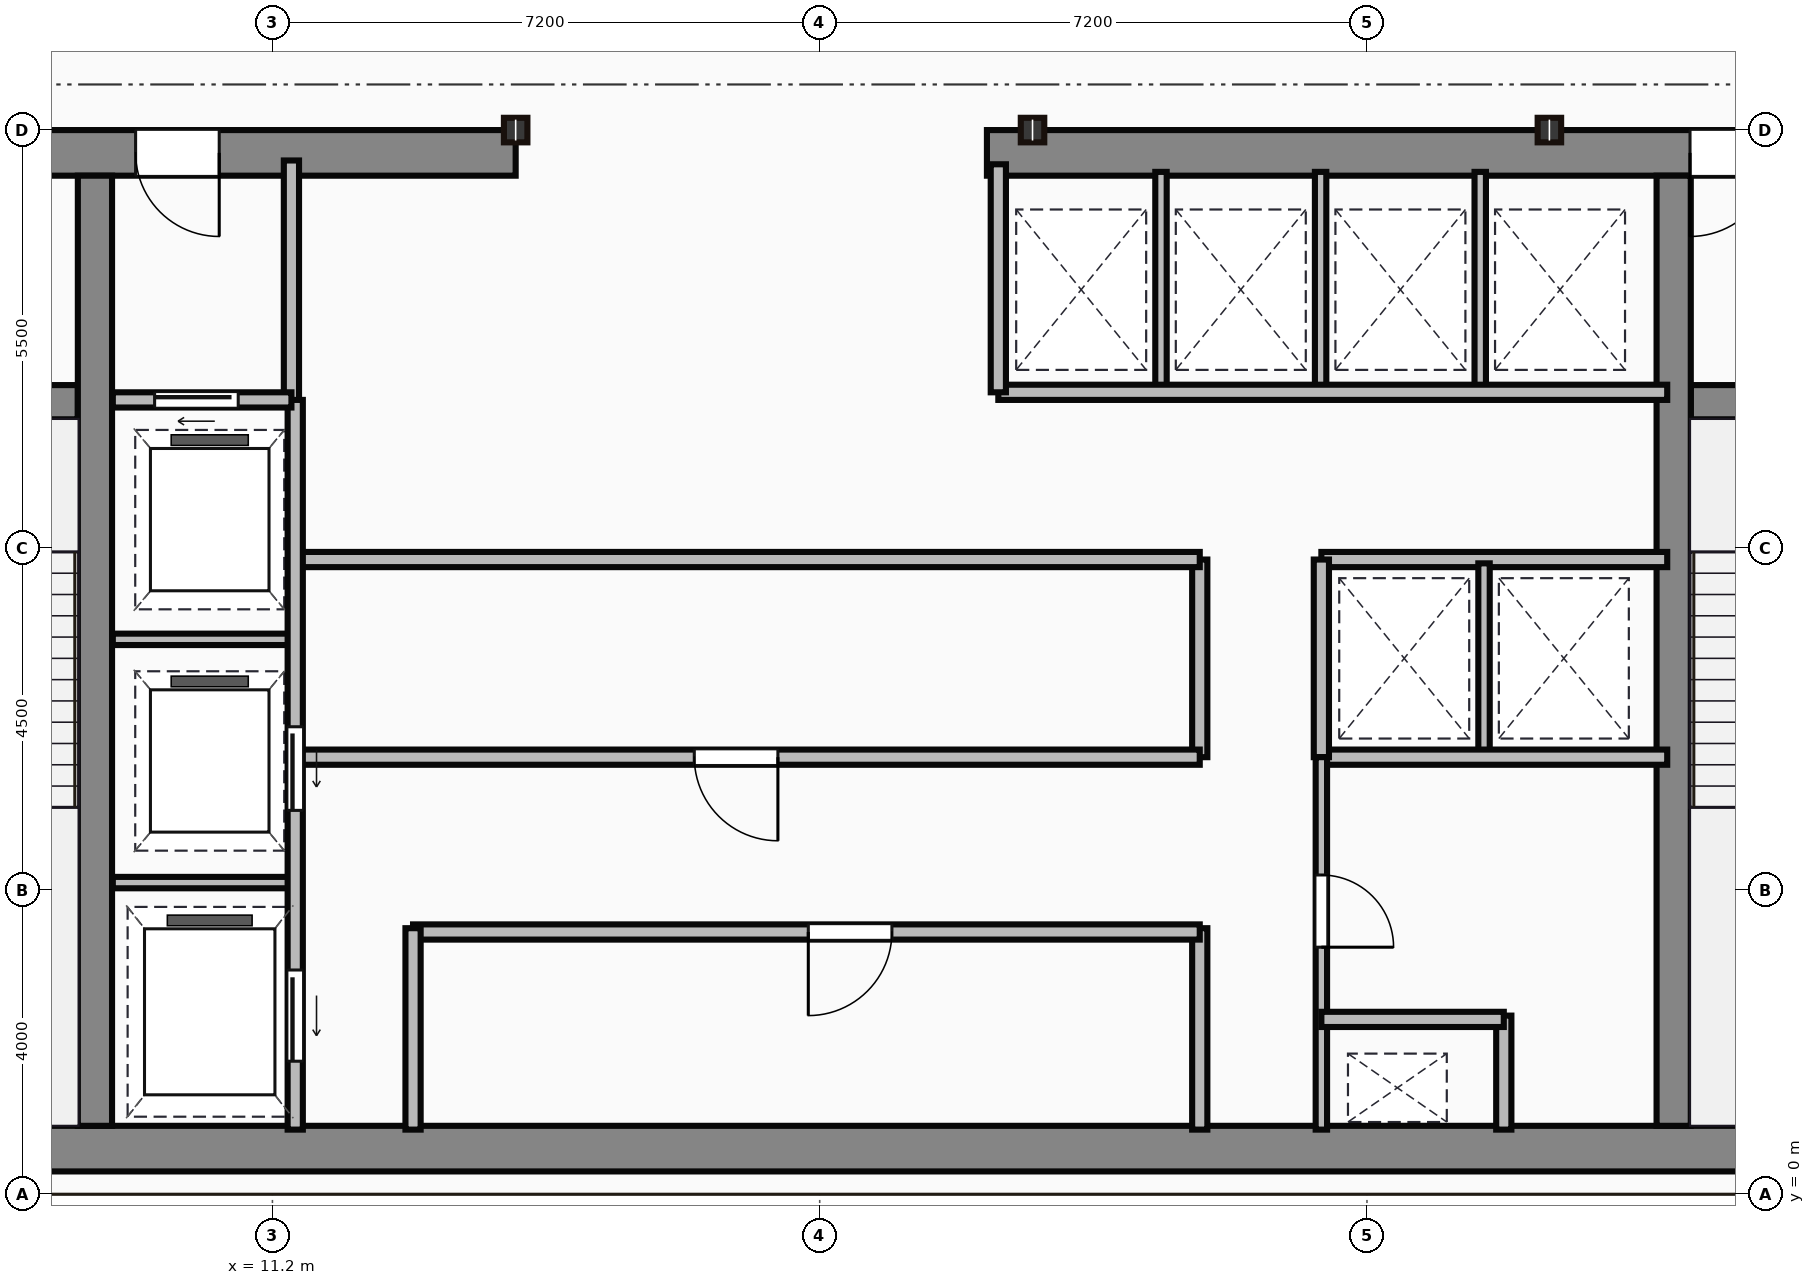
"""IFC4 building model, lengths in metres.
Left out: names, types, materials, properties, quantities, classifications, styles, units other than length and angle.
Written with IfcOpenShell. Run it as: python <this file> out.ifc"""

import sys

from ifc_helpers import new_model, si_unit, direction, frame, frame_2d, origin, origin_2d, place, context, subcontext, project, spatial, rectangle, i_section, extrude, source, transform, mapped, element, fill, save


model = new_model("IFC4")
c1 = context("Model", 3, precision=1e-05, world=origin(), true_north=direction((0.0, 1.0)))
c2 = subcontext(c1, "Body", "Model", "MODEL_VIEW")
j1 = project(units=[si_unit("LENGTHUNIT", "METRE"), si_unit("PLANEANGLEUNIT", "RADIAN")], contexts=[c1])
p1 = place(None, origin())
s1 = spatial("IfcSite", under=j1, at=p1, CompositionType="ELEMENT")
p2 = place(p1, origin())
s2 = spatial("IfcBuilding", under=s1, at=p2, CompositionType="ELEMENT")
p3 = place(p2, frame((0.0, 0.0, 236.05)))
s3 = spatial("IfcBuildingStorey", under=s2, at=p3, CompositionType="ELEMENT", Elevation=236.05)
m1 = source(origin(), c2, "Body", "SweptSolid", [
    extrude(rectangle(XDim=29.5, YDim=0.6, at=frame_2d((14.75, 0.0))), origin(), (0.0, 0.0, 1.0), 4.5),
])
p4 = place(p3, frame((4.5, 0.6, 0.0), z_axis=(0.0, 0.0, 1.0), x_axis=(1.0, 0.0, 0.0)))
e1 = element("IfcWall", 1, at=p4, inside=s3, PredefinedType="SHEAR", context=c2, shape_type="MappedRepresentation", body=[
    mapped(m1, transform((0.0, 0.0, 0.0))),
])
m2 = source(origin(), c2, "Body", "SweptSolid", [
    extrude(rectangle(XDim=9.1, YDim=0.6, at=frame_2d((4.55, 0.0))), origin(), (0.0, 0.0, 1.0), 4.5),
])
p5 = place(p3, frame((5.3, 13.7, 0.0), z_axis=(0.0, 0.0, 1.0), x_axis=(1.0, 0.0, 0.0)))
e2 = element("IfcWall", 2, at=p5, inside=s3, PredefinedType="SHEAR", context=c2, shape_type="MappedRepresentation", body=[
    mapped(m2, transform((0.0, 0.0, 0.0))),
])
p6 = place(p5, frame((4.1, 0.0, 0.0)))
e3 = element("IfcOpeningElement", 3, at=p6, cuts=e2, PredefinedType="OPENING", context=c2, shape_type="SweptSolid", body=[
    extrude(rectangle(XDim=1.1, YDim=2.15, at=frame_2d((0.55, 1.075))), frame((0.0, 0.31, 0.0), z_axis=(0.0, -1.0, 0.0), x_axis=(1.0, 0.0, 0.0)), (0.0, 0.0, 1.0), 0.62),
])
m3 = source(origin(), c2, "Body", "SweptSolid", [
    extrude(rectangle(XDim=12.6, YDim=0.6, at=frame_2d((6.3, 0.0))), origin(), (0.0, 0.0, 1.0), 4.5),
])
p7 = place(p3, frame((20.6, 13.7, 0.0), z_axis=(0.0, 0.0, 1.0), x_axis=(1.0, 0.0, 0.0)))
e4 = element("IfcWall", 4, at=p7, inside=s3, PredefinedType="SHEAR", context=c2, shape_type="MappedRepresentation", body=[
    mapped(m3, transform((0.0, 0.0, 0.0))),
])
p8 = place(p7, frame((9.25, 0.0, 0.0)))
e5 = element("IfcOpeningElement", 5, at=p8, cuts=e4, PredefinedType="OPENING", context=c2, shape_type="SweptSolid", body=[
    extrude(rectangle(XDim=1.1, YDim=2.15, at=frame_2d((0.55, 1.075))), frame((0.0, 0.31, 0.0), z_axis=(0.0, -1.0, 0.0), x_axis=(1.0, 0.0, 0.0)), (0.0, 0.0, 1.0), 0.62),
])
m4 = source(origin(), c2, "Body", "SweptSolid", [
    extrude(rectangle(XDim=12.5, YDim=0.45, at=frame_2d((6.25, 0.0))), origin(), (0.0, 0.0, 1.0), 4.5),
])
for number, where, z_axis, x_axis in (
    (6, (8.865, 0.9, 0.0), (0.0, 0.0, 1.0), (0.0, 1.0, 0.0)),
    (7, (29.635, 0.9, 0.0), (0.0, 0.0, 1.0), (0.0, 1.0, 0.0)),
):
    element("IfcWall", number, at=place(p3, frame(where, z_axis=z_axis, x_axis=x_axis)), inside=s3, PredefinedType="SHEAR", context=c2, shape_type="MappedRepresentation", body=[
        mapped(m4, transform((0.0, 0.0, 0.0))),
    ])
m5 = source(origin(), c2, "Body", "SweptSolid", [
    extrude(rectangle(XDim=3.39, YDim=0.45, at=frame_2d((1.695, 0.0))), origin(), (0.0, 0.0, 1.0), 4.5),
])
p9 = place(p3, frame((5.25, 10.42, 0.0), z_axis=(0.0, 0.0, 1.0), x_axis=(1.0, 0.0, 0.0)))
e8 = element("IfcWall", 8, at=p9, inside=s3, PredefinedType="SHEAR", context=c2, shape_type="MappedRepresentation", body=[
    mapped(m5, transform((0.0, 0.0, 0.0))),
])
p10 = place(p9, frame((1.05, 0.0, 0.0)))
e9 = element("IfcOpeningElement", 9, at=p10, cuts=e8, PredefinedType="OPENING", context=c2, shape_type="SweptSolid", body=[
    extrude(rectangle(XDim=1.1, YDim=2.15, at=frame_2d((0.55, 1.075))), frame((0.0, 0.235, 0.0), z_axis=(0.0, -1.0, 0.0), x_axis=(1.0, 0.0, 0.0)), (0.0, 0.0, 1.0), 0.47),
])
p11 = place(p3, frame((29.86, 10.42, 0.0), z_axis=(0.0, 0.0, 1.0), x_axis=(1.0, 0.0, 0.0)))
e10 = element("IfcWall", 10, at=p11, inside=s3, PredefinedType="SHEAR", context=c2, shape_type="MappedRepresentation", body=[
    mapped(m5, transform((0.0, 0.0, 0.0))),
])
p12 = place(p11, frame((1.1, 0.0, 0.0)))
e11 = element("IfcOpeningElement", 11, at=p12, cuts=e10, PredefinedType="OPENING", context=c2, shape_type="SweptSolid", body=[
    extrude(rectangle(XDim=1.1, YDim=2.15, at=frame_2d((0.55, 1.075))), frame((0.0, 0.235, 0.0), z_axis=(0.0, -1.0, 0.0), x_axis=(1.0, 0.0, 0.0)), (0.0, 0.0, 1.0), 0.47),
])
m6 = source(origin(), c2, "Body", "SweptSolid", [
    extrude(i_section(OverallWidth=0.309, OverallDepth=0.323, WebThickness=0.014, FlangeThickness=0.023, at=origin_2d()), origin(), (0.0, 0.0, 1.0), 4.5),
])
for number, where, z_axis, x_axis in (
    (12, (14.4, 14.0, 0.0), (0.0, 0.0, 1.0), (1.0, 0.0, 0.0)),
    (13, (21.2, 14.0, 0.0), (0.0, 0.0, 1.0), (1.0, 0.0, 0.0)),
    (14, (28.0, 14.0, 0.0), (0.0, 0.0, 1.0), (1.0, 0.0, 0.0)),
):
    element("IfcColumn", number, at=place(p3, frame(where, z_axis=z_axis, x_axis=x_axis)), inside=s3, PredefinedType="COLUMN", context=c2, shape_type="MappedRepresentation", body=[
        mapped(m6, transform((0.0, 0.0, 0.0))),
    ])
m7 = source(origin(), c2, "Body", "SweptSolid", [
    extrude(rectangle(XDim=3.18, YDim=0.2, at=frame_2d((1.59, 0.0))), origin(), (0.0, 0.0, 1.0), 4.25),
])
p13 = place(p3, frame((11.45, 10.42, 0.0), z_axis=(0.0, 0.0, 1.0), x_axis=(0.0, 1.0, 0.0)))
e15 = element("IfcWall", 15, at=p13, inside=s3, PredefinedType="PARTITIONING", context=c2, shape_type="MappedRepresentation", body=[
    mapped(m7, transform((0.0, 0.0, 0.0))),
])
m8 = source(origin(), c2, "Body", "SweptSolid", [
    extrude(rectangle(XDim=2.35, YDim=0.2, at=frame_2d((1.175, 0.0))), origin(), (0.0, 0.0, 1.0), 4.25),
])
p14 = place(p3, frame((9.1, 10.45, 0.0), z_axis=(0.0, 0.0, 1.0), x_axis=(1.0, 0.0, 0.0)))
e16 = element("IfcWall", 16, at=p14, inside=s3, PredefinedType="PARTITIONING", context=c2, shape_type="MappedRepresentation", body=[
    mapped(m8, transform((0.0, 0.0, 0.0))),
])
p15 = place(p14, frame((0.55, 0.0, 0.0)))
e17 = element("IfcOpeningElement", 17, at=p15, cuts=e16, PredefinedType="OPENING", context=c2, shape_type="SweptSolid", body=[
    extrude(rectangle(XDim=1.1, YDim=2.15, at=frame_2d((0.55, 1.075))), frame((0.0, 0.11, 0.0), z_axis=(0.0, -1.0, 0.0), x_axis=(1.0, 0.0, 0.0)), (0.0, 0.0, 1.0), 0.22),
])
m9 = source(origin(), c2, "Body", "SweptSolid", [
    extrude(rectangle(XDim=9.6, YDim=0.2, at=frame_2d((4.8, 0.0))), origin(), (0.0, 0.0, 1.0), 4.25),
])
p16 = place(p3, frame((11.5, 0.85, 0.0), z_axis=(0.0, 0.0, 1.0), x_axis=(0.0, 1.0, 0.0)))
e18 = element("IfcWall", 18, at=p16, inside=s3, PredefinedType="PARTITIONING", context=c2, shape_type="MappedRepresentation", body=[
    mapped(m9, transform((0.0, 0.0, 0.0))),
])
p17 = place(p16, frame((4.2, 0.0, 0.0)))
e19 = element("IfcOpeningElement", 19, at=p17, cuts=e18, PredefinedType="OPENING", context=c2, shape_type="SweptSolid", body=[
    extrude(rectangle(XDim=1.1, YDim=2.15, at=frame_2d((0.55, 1.075))), frame((0.0, 0.11, 0.0), z_axis=(0.0, -1.0, 0.0), x_axis=(1.0, 0.0, 0.0)), (0.0, 0.0, 1.0), 0.22),
])
p18 = place(p16, frame((0.9, 0.0, 0.0)))
e20 = element("IfcOpeningElement", 20, at=p18, cuts=e18, PredefinedType="OPENING", context=c2, shape_type="SweptSolid", body=[
    extrude(rectangle(XDim=1.2, YDim=2.15, at=frame_2d((0.6, 1.075))), frame((0.0, 0.11, 0.0), z_axis=(0.0, -1.0, 0.0), x_axis=(1.0, 0.0, 0.0)), (0.0, 0.0, 1.0), 0.22),
])
m10 = source(origin(), c2, "Body", "SweptSolid", [
    extrude(rectangle(XDim=2.4, YDim=0.15, at=frame_2d((1.2, 0.0))), origin(), (0.0, 0.0, 1.0), 4.25),
])
for number, where, z_axis, x_axis in (
    (21, (9.1, 4.1, 0.0), (0.0, 0.0, 1.0), (1.0, 0.0, 0.0)),
    (22, (9.1, 7.3, 0.0), (0.0, 0.0, 1.0), (1.0, 0.0, 0.0)),
):
    element("IfcWall", number, at=place(p3, frame(where, z_axis=z_axis, x_axis=x_axis)), inside=s3, PredefinedType="PARTITIONING", context=c2, shape_type="MappedRepresentation", body=[
        mapped(m10, transform((0.0, 0.0, 0.0))),
    ])
m11 = source(origin(), c2, "Body", "SweptSolid", [
    extrude(rectangle(XDim=2.65, YDim=0.2, at=frame_2d((1.325, 0.0))), origin(), (0.0, 0.0, 1.0), 4.25),
])
p19 = place(p3, frame((13.05, 0.85, 0.0), z_axis=(0.0, 0.0, 1.0), x_axis=(0.0, 1.0, 0.0)))
e23 = element("IfcWall", 23, at=p19, inside=s3, PredefinedType="PARTITIONING", context=c2, shape_type="MappedRepresentation", body=[
    mapped(m11, transform((0.0, 0.0, 0.0))),
])
m12 = source(origin(), c2, "Body", "SweptSolid", [
    extrude(rectangle(XDim=10.35, YDim=0.2, at=frame_2d((5.175, 0.0))), origin(), (0.0, 0.0, 1.0), 4.25),
])
p20 = place(p3, frame((13.05, 3.45, 0.0), z_axis=(0.0, 0.0, 1.0), x_axis=(1.0, 0.0, 0.0)))
e24 = element("IfcWall", 24, at=p20, inside=s3, PredefinedType="PARTITIONING", context=c2, shape_type="MappedRepresentation", body=[
    mapped(m12, transform((0.0, 0.0, 0.0))),
])
p21 = place(p20, frame((5.2, 0.0, 0.0)))
e25 = element("IfcOpeningElement", 25, at=p21, cuts=e24, PredefinedType="OPENING", context=c2, shape_type="SweptSolid", body=[
    extrude(rectangle(XDim=1.1, YDim=2.15, at=frame_2d((0.55, 1.075))), frame((0.0, 0.11, 0.0), z_axis=(0.0, -1.0, 0.0), x_axis=(1.0, 0.0, 0.0)), (0.0, 0.0, 1.0), 0.22),
])
p22 = place(p3, frame((23.4, 0.85, 0.0), z_axis=(0.0, 0.0, 1.0), x_axis=(0.0, 1.0, 0.0)))
e26 = element("IfcWall", 26, at=p22, inside=s3, PredefinedType="PARTITIONING", context=c2, shape_type="MappedRepresentation", body=[
    mapped(m11, transform((0.0, 0.0, 0.0))),
])
m13 = source(origin(), c2, "Body", "SweptSolid", [
    extrude(rectangle(XDim=11.85, YDim=0.2, at=frame_2d((5.925, 0.0))), origin(), (0.0, 0.0, 1.0), 4.25),
])
p23 = place(p3, frame((11.55, 5.75, 0.0), z_axis=(0.0, 0.0, 1.0), x_axis=(1.0, 0.0, 0.0)))
e27 = element("IfcWall", 27, at=p23, inside=s3, PredefinedType="PARTITIONING", context=c2, shape_type="MappedRepresentation", body=[
    mapped(m13, transform((0.0, 0.0, 0.0))),
])
p24 = place(p23, frame((5.2, 0.0, 0.0)))
e28 = element("IfcOpeningElement", 28, at=p24, cuts=e27, PredefinedType="OPENING", context=c2, shape_type="SweptSolid", body=[
    extrude(rectangle(XDim=1.1, YDim=2.15, at=frame_2d((0.55, 1.075))), frame((0.0, 0.11, 0.0), z_axis=(0.0, -1.0, 0.0), x_axis=(1.0, 0.0, 0.0)), (0.0, 0.0, 1.0), 0.22),
])
p25 = place(p3, frame((11.55, 8.35, 0.0), z_axis=(0.0, 0.0, 1.0), x_axis=(1.0, 0.0, 0.0)))
e29 = element("IfcWall", 29, at=p25, inside=s3, PredefinedType="PARTITIONING", context=c2, shape_type="MappedRepresentation", body=[
    mapped(m13, transform((0.0, 0.0, 0.0))),
])
m14 = source(origin(), c2, "Body", "SweptSolid", [
    extrude(rectangle(XDim=2.6, YDim=0.2, at=frame_2d((1.3, 0.0))), origin(), (0.0, 0.0, 1.0), 4.25),
])
p26 = place(p3, frame((23.4, 5.75, 0.0), z_axis=(0.0, 0.0, 1.0), x_axis=(0.0, 1.0, 0.0)))
e30 = element("IfcWall", 30, at=p26, inside=s3, PredefinedType="PARTITIONING", context=c2, shape_type="MappedRepresentation", body=[
    mapped(m14, transform((0.0, 0.0, 0.0))),
])
m15 = source(origin(), c2, "Body", "SweptSolid", [
    extrude(rectangle(XDim=8.8, YDim=0.2, at=frame_2d((4.4, 0.0))), origin(), (0.0, 0.0, 1.0), 4.25),
])
p27 = place(p3, frame((20.75, 10.55, 0.0), z_axis=(0.0, 0.0, 1.0), x_axis=(1.0, 0.0, 0.0)))
e31 = element("IfcWall", 31, at=p27, inside=s3, PredefinedType="PARTITIONING", context=c2, shape_type="MappedRepresentation", body=[
    mapped(m15, transform((0.0, 0.0, 0.0))),
])
m16 = source(origin(), c2, "Body", "SweptSolid", [
    extrude(rectangle(XDim=3.0, YDim=0.2, at=frame_2d((1.5, 0.0))), origin(), (0.0, 0.0, 1.0), 4.25),
])
p28 = place(p3, frame((20.75, 10.55, 0.0), z_axis=(0.0, 0.0, 1.0), x_axis=(0.0, 1.0, 0.0)))
e32 = element("IfcWall", 32, at=p28, inside=s3, PredefinedType="PARTITIONING", context=c2, shape_type="MappedRepresentation", body=[
    mapped(m16, transform((0.0, 0.0, 0.0))),
])
m17 = source(origin(), c2, "Body", "SweptSolid", [
    extrude(rectangle(XDim=2.85, YDim=0.15, at=frame_2d((1.425, 0.0))), origin(), (0.0, 0.0, 1.0), 4.25),
])
for number, where, z_axis, x_axis in (
    (33, (22.89, 10.6, 0.0), (0.0, 0.0, 1.0), (0.0, 1.0, 0.0)),
    (34, (24.99, 10.6, 0.0), (0.0, 0.0, 1.0), (0.0, 1.0, 0.0)),
    (35, (27.09, 10.6, 0.0), (0.0, 0.0, 1.0), (0.0, 1.0, 0.0)),
):
    element("IfcWall", number, at=place(p3, frame(where, z_axis=z_axis, x_axis=x_axis)), inside=s3, PredefinedType="PARTITIONING", context=c2, shape_type="MappedRepresentation", body=[
        mapped(m17, transform((0.0, 0.0, 0.0))),
    ])
m18 = source(origin(), c2, "Body", "SweptSolid", [
    extrude(rectangle(XDim=4.55, YDim=0.2, at=frame_2d((2.275, 0.0))), origin(), (0.0, 0.0, 1.0), 4.25),
])
for number, where, z_axis, x_axis in (
    (36, (25.0, 8.35, 0.0), (0.0, 0.0, 1.0), (1.0, 0.0, 0.0)),
    (37, (25.0, 5.75, 0.0), (0.0, 0.0, 1.0), (1.0, 0.0, 0.0)),
):
    element("IfcWall", number, at=place(p3, frame(where, z_axis=z_axis, x_axis=x_axis)), inside=s3, PredefinedType="PARTITIONING", context=c2, shape_type="MappedRepresentation", body=[
        mapped(m18, transform((0.0, 0.0, 0.0))),
    ])
p29 = place(p3, frame((25.0, 5.75, 0.0), z_axis=(0.0, 0.0, 1.0), x_axis=(0.0, 1.0, 0.0)))
e38 = element("IfcWall", 38, at=p29, inside=s3, PredefinedType="PARTITIONING", context=c2, shape_type="MappedRepresentation", body=[
    mapped(m14, transform((0.0, 0.0, 0.0))),
])
m19 = source(origin(), c2, "Body", "SweptSolid", [
    extrude(rectangle(XDim=2.5, YDim=0.15, at=frame_2d((1.25, 0.0))), origin(), (0.0, 0.0, 1.0), 4.25),
])
p30 = place(p3, frame((27.14, 5.8, 0.0), z_axis=(0.0, 0.0, 1.0), x_axis=(0.0, 1.0, 0.0)))
e39 = element("IfcWall", 39, at=p30, inside=s3, PredefinedType="PARTITIONING", context=c2, shape_type="MappedRepresentation", body=[
    mapped(m19, transform((0.0, 0.0, 0.0))),
])
m20 = source(origin(), c2, "Body", "SweptSolid", [
    extrude(rectangle(XDim=4.9, YDim=0.15, at=frame_2d((2.45, 0.0))), origin(), (0.0, 0.0, 1.0), 4.25),
])
p31 = place(p3, frame((25.0, 0.85, 0.0), z_axis=(0.0, 0.0, 1.0), x_axis=(0.0, 1.0, 0.0)))
e40 = element("IfcWall", 40, at=p31, inside=s3, PredefinedType="PARTITIONING", context=c2, shape_type="MappedRepresentation", body=[
    mapped(m20, transform((0.0, 0.0, 0.0))),
])
p32 = place(p31, frame((2.4, 0.0, 0.0)))
e41 = element("IfcOpeningElement", 41, at=p32, cuts=e40, PredefinedType="OPENING", context=c2, shape_type="SweptSolid", body=[
    extrude(rectangle(XDim=0.95, YDim=2.15, at=frame_2d((0.475, 1.075))), frame((0.0, 0.085, 0.0), z_axis=(0.0, -1.0, 0.0), x_axis=(1.0, 0.0, 0.0)), (0.0, 0.0, 1.0), 0.17),
])
m21 = source(origin(), c2, "Body", "SweptSolid", [
    extrude(rectangle(XDim=2.4, YDim=0.2, at=frame_2d((1.2, 0.0))), origin(), (0.0, 0.0, 1.0), 4.25),
])
p33 = place(p3, frame((25.0, 2.3, 0.0), z_axis=(0.0, 0.0, 1.0), x_axis=(1.0, 0.0, 0.0)))
e42 = element("IfcWall", 42, at=p33, inside=s3, PredefinedType="PARTITIONING", context=c2, shape_type="MappedRepresentation", body=[
    mapped(m21, transform((0.0, 0.0, 0.0))),
])
m22 = source(origin(), c2, "Body", "SweptSolid", [
    extrude(rectangle(XDim=1.5, YDim=0.2, at=frame_2d((0.75, 0.0))), origin(), (0.0, 0.0, 1.0), 4.25),
])
p34 = place(p3, frame((27.4, 0.85, 0.0), z_axis=(0.0, 0.0, 1.0), x_axis=(0.0, 1.0, 0.0)))
e43 = element("IfcWall", 43, at=p34, inside=s3, PredefinedType="PARTITIONING", context=c2, shape_type="MappedRepresentation", body=[
    mapped(m22, transform((0.0, 0.0, 0.0))),
])
m23 = source(origin(), c2, "Body", "SweptSolid", [
    extrude(rectangle(XDim=1.1, YDim=2.15, at=frame_2d((0.55, 1.075))), frame((0.0, 0.025, 0.0), z_axis=(0.0, -1.0, 0.0), x_axis=(1.0, 0.0, 0.0)), (0.0, 0.0, 1.0), 0.05),
])
p35 = place(p6, origin())
e44 = element("IfcDoor", 44, at=p35, inside=s3, OperationType="SINGLE_SWING_RIGHT", PredefinedType="DOOR", context=c2, shape_type="MappedRepresentation", body=[
    mapped(m23, transform((0.0, 0.0, 0.0))),
])
fill(e3, e44)
p36 = place(p8, origin())
e45 = element("IfcDoor", 45, at=p36, inside=s3, OperationType="SINGLE_SWING_LEFT", PredefinedType="DOOR", context=c2, shape_type="MappedRepresentation", body=[
    mapped(m23, transform((0.0, 0.0, 0.0))),
])
fill(e5, e45)
p37 = place(p15, origin())
e46 = element("IfcDoor", 46, at=p37, inside=s3, OperationType="SLIDING_TO_LEFT", PredefinedType="DOOR", context=c2, shape_type="MappedRepresentation", body=[
    mapped(m23, transform((0.0, 0.0, 0.0))),
])
fill(e17, e46)
p38 = place(p17, frame((1.1, 0.0, 0.0), z_axis=(0.0, 0.0, 1.0), x_axis=(-1.0, 0.0, 0.0)))
e47 = element("IfcDoor", 47, at=p38, inside=s3, OperationType="SLIDING_TO_LEFT", PredefinedType="DOOR", context=c2, shape_type="MappedRepresentation", body=[
    mapped(m23, transform((0.0, 0.0, 0.0))),
])
fill(e19, e47)
m24 = source(origin(), c2, "Body", "SweptSolid", [
    extrude(rectangle(XDim=1.2, YDim=2.15, at=frame_2d((0.6, 1.075))), frame((0.0, 0.025, 0.0), z_axis=(0.0, -1.0, 0.0), x_axis=(1.0, 0.0, 0.0)), (0.0, 0.0, 1.0), 0.05),
])
p39 = place(p18, frame((1.2, 0.0, 0.0), z_axis=(0.0, 0.0, 1.0), x_axis=(-1.0, 0.0, 0.0)))
e48 = element("IfcDoor", 48, at=p39, inside=s3, OperationType="SLIDING_TO_LEFT", PredefinedType="DOOR", context=c2, shape_type="MappedRepresentation", body=[
    mapped(m24, transform((0.0, 0.0, 0.0))),
])
fill(e20, e48)
p40 = place(p21, origin())
e49 = element("IfcDoor", 49, at=p40, inside=s3, OperationType="SINGLE_SWING_LEFT", PredefinedType="DOOR", context=c2, shape_type="MappedRepresentation", body=[
    mapped(m23, transform((0.0, 0.0, 0.0))),
])
fill(e25, e49)
p41 = place(p24, frame((1.1, 0.0, 0.0), z_axis=(0.0, 0.0, 1.0), x_axis=(-1.0, 0.0, 0.0)))
e50 = element("IfcDoor", 50, at=p41, inside=s3, OperationType="SINGLE_SWING_RIGHT", PredefinedType="DOOR", context=c2, shape_type="MappedRepresentation", body=[
    mapped(m23, transform((0.0, 0.0, 0.0))),
])
fill(e28, e50)
m25 = source(origin(), c2, "Body", "SweptSolid", [
    extrude(rectangle(XDim=0.95, YDim=2.15, at=frame_2d((0.475, 1.075))), frame((0.0, 0.025, 0.0), z_axis=(0.0, -1.0, 0.0), x_axis=(1.0, 0.0, 0.0)), (0.0, 0.0, 1.0), 0.05),
])
p42 = place(p32, origin())
e51 = element("IfcDoor", 51, at=p42, inside=s3, OperationType="SINGLE_SWING_LEFT", PredefinedType="DOOR", context=c2, shape_type="MappedRepresentation", body=[
    mapped(m25, transform((0.0, 0.0, 0.0))),
])
fill(e41, e51)
save(model, sys.argv[1])
